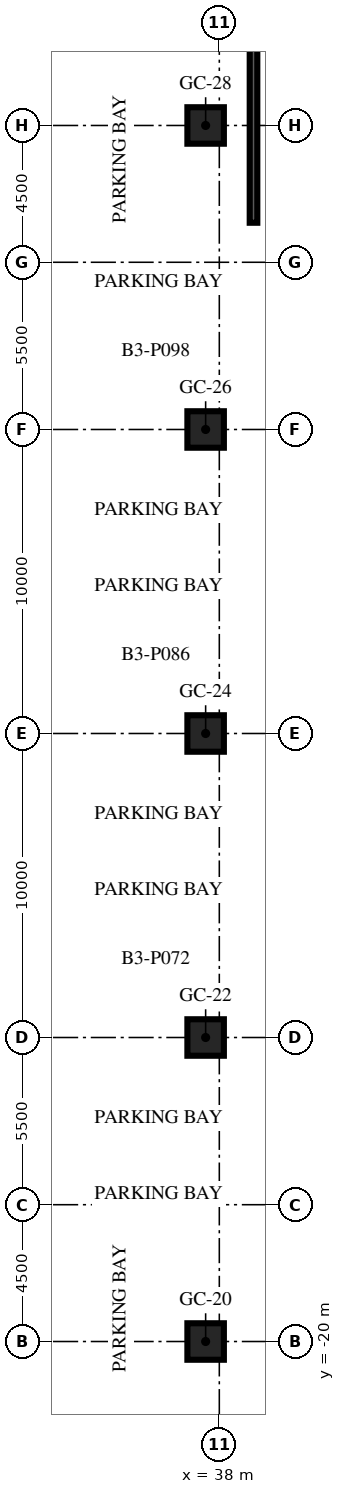
"""IFC4 building model, lengths in metres.
Left out: names, types, materials, properties, quantities, classifications, styles, units other than length and angle.
Written with IfcOpenShell. Run it as: python <this file> out.ifc"""

import sys

from ifc_helpers import new_model, si_unit, direction, frame, origin, origin_2d, place, context, subcontext, project, spatial, polyline, rectangle, outline, extrude, element, save


model = new_model("IFC4")
c1 = context("Model", 3, precision=1e-05, world=origin(), true_north=direction((0.0, 1.0)))
c2 = subcontext(c1, "Body", "Model", "MODEL_VIEW")
j1 = project(units=[si_unit("LENGTHUNIT", "METRE"), si_unit("PLANEANGLEUNIT", "RADIAN")], contexts=[c1])
p1 = place(None, origin())
s1 = spatial("IfcSite", under=j1, at=p1, CompositionType="ELEMENT")
p2 = place(p1, origin())
s2 = spatial("IfcBuilding", under=s1, at=p2, CompositionType="ELEMENT")
p3 = place(p2, frame((0.0, 0.0, -13.2)))
s3 = spatial("IfcBuildingStorey", under=s2, at=p3, CompositionType="ELEMENT", Elevation=-13.2)
for number, where, z_axis, x_axis in (
    (1, (37.55, -20.0, -0.4), (0.0, 0.0, 1.0), (1.0, 0.0, 0.0)),
    (2, (37.55, -10.0, -0.4), (0.0, 0.0, 1.0), (1.0, 0.0, 0.0)),
    (3, (37.55, 0.0, -0.4), (0.0, 0.0, 1.0), (1.0, 0.0, 0.0)),
    (4, (37.55, 10.0, -0.4), (0.0, 0.0, 1.0), (1.0, 0.0, 0.0)),
    (5, (37.55, 20.0, -0.4), (0.0, 0.0, 1.0), (1.0, 0.0, 0.0)),
):
    element("IfcColumn", number, at=place(p3, frame(where, z_axis=z_axis, x_axis=x_axis)), inside=s3, PredefinedType="COLUMN", context=c2, shape_type="SweptSolid", body=[
        extrude(rectangle(XDim=1.2, YDim=1.2, at=origin_2d()), origin(), (0.0, 0.0, 1.0), 4.6),
    ])
p4 = place(p3, frame((39.125, 16.8, 0.0), z_axis=(0.0, 0.0, 1.0), x_axis=(0.0, 1.0, 0.0)))
e6 = element("IfcWall", 6, at=p4, inside=s3, PredefinedType="SOLIDWALL", context=c2, shape_type="SweptSolid", body=[
    extrude(outline(polyline([(0.0, 0.0), (28.2, 0.0), (28.2, 4.2), (11.0, 4.2), (11.0, 3.9), (0.0, 3.9), (0.0, 0.0)])), frame((0.0, 0.125, 0.0), z_axis=(0.0, -1.0, 0.0), x_axis=(1.0, 0.0, 0.0)), (0.0, 0.0, 1.0), 0.25),
])
save(model, sys.argv[1])
